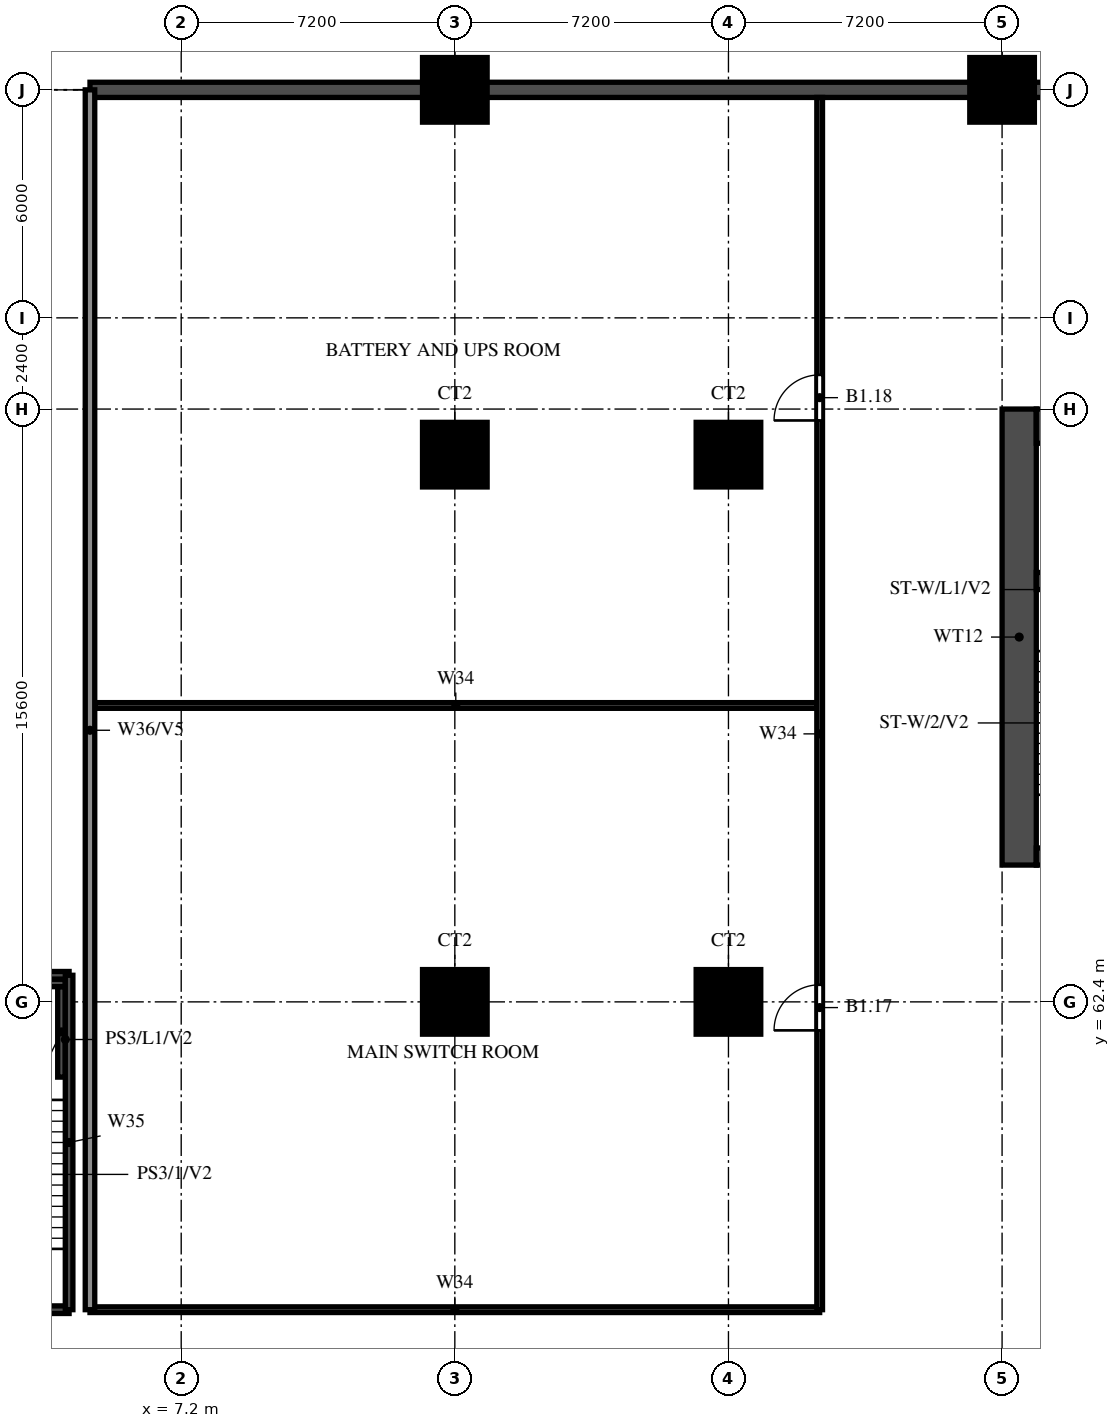
"""IFC4 building model, lengths in metres.
Left out: names, types, materials, properties, quantities, classifications, styles, units other than length and angle.
Written with IfcOpenShell. Run it as: python <this file> out.ifc"""

import sys

from ifc_helpers import new_model, si_unit, direction, frame, frame_2d, origin, origin_2d, place, context, subcontext, project, spatial, rectangle, extrude, source, transform, mapped, element, fill, save


model = new_model("IFC4")
c1 = context("Model", 3, precision=1e-05, world=origin(), true_north=direction((0.0, 1.0)))
c2 = subcontext(c1, "Body", "Model", "MODEL_VIEW")
j1 = project(units=[si_unit("LENGTHUNIT", "METRE"), si_unit("PLANEANGLEUNIT", "RADIAN")], contexts=[c1])
p1 = place(None, origin())
s1 = spatial("IfcSite", under=j1, at=p1, CompositionType="ELEMENT")
p2 = place(p1, origin())
s2 = spatial("IfcBuilding", under=s1, at=p2, CompositionType="ELEMENT")
p3 = place(p2, frame((0.0, 0.0, -5.4)))
s3 = spatial("IfcBuildingStorey", under=s2, at=p3, CompositionType="ELEMENT", Elevation=-5.4)
m1 = source(origin(), c2, "Body", "SweptSolid", [
    extrude(rectangle(XDim=1.7, YDim=1.7, at=origin_2d()), origin(), (0.0, 0.0, 1.0), 5.0),
])
for number, where, z_axis, x_axis in (
    (1, (14.4, 62.4, 0.0), (0.0, 0.0, 1.0), (1.0, 0.0, 0.0)),
    (2, (21.6, 62.4, 0.0), (0.0, 0.0, 1.0), (1.0, 0.0, 0.0)),
    (3, (14.4, 76.8, 0.0), (0.0, 0.0, 1.0), (1.0, 0.0, 0.0)),
    (4, (21.6, 76.8, 0.0), (0.0, 0.0, 1.0), (1.0, 0.0, 0.0)),
    (5, (14.4, 86.4, 0.0), (0.0, 0.0, 1.0), (1.0, 0.0, 0.0)),
    (6, (28.8, 86.4, 0.0), (0.0, 0.0, 1.0), (1.0, 0.0, 0.0)),
):
    element("IfcColumn", number, at=place(p3, frame(where, z_axis=z_axis, x_axis=x_axis)), inside=s3, PredefinedType="COLUMN", context=c2, shape_type="MappedRepresentation", body=[
        mapped(m1, transform((0.0, 0.0, 0.0))),
    ])
p4 = place(p3, frame((29.25, 66.0, 0.0), z_axis=(0.0, 0.0, 1.0), x_axis=(0.0, 1.0, 0.0)))
e7 = element("IfcWall", 7, at=p4, inside=s3, PredefinedType="SHEAR", context=c2, shape_type="SweptSolid", body=[
    extrude(rectangle(XDim=12.0, YDim=0.9, at=frame_2d((6.0, 0.0))), origin(), (0.0, 0.0, 1.0), 5.0),
])
p5 = place(p3, frame((29.7, 77.55, 0.0), z_axis=(0.0, 0.0, 1.0), x_axis=(1.0, 0.0, 0.0)))
e8 = element("IfcWall", 8, at=p5, inside=s3, PredefinedType="SHEAR", context=c2, shape_type="SweptSolid", body=[
    extrude(rectangle(XDim=41.4, YDim=0.9, at=frame_2d((20.7, 0.0))), origin(), (0.0, 0.0, 1.0), 5.0),
])
p6 = place(p3, frame((29.7, 66.225, 0.0), z_axis=(0.0, 0.0, 1.0), x_axis=(1.0, 0.0, 0.0)))
e9 = element("IfcWall", 9, at=p6, inside=s3, PredefinedType="SHEAR", context=c2, shape_type="SweptSolid", body=[
    extrude(rectangle(XDim=41.4, YDim=0.45, at=frame_2d((20.7, 0.0))), origin(), (0.0, 0.0, 1.0), 5.0),
])
p7 = place(p6, frame((0.925, 0.0, 0.0)))
e10 = element("IfcOpeningElement", 10, at=p7, cuts=e9, PredefinedType="OPENING", context=c2, shape_type="SweptSolid", body=[
    extrude(rectangle(XDim=1.1, YDim=2.1, at=frame_2d((0.55, 1.05))), frame((0.0, 0.235, 0.0), z_axis=(0.0, -1.0, 0.0), x_axis=(1.0, 0.0, 0.0)), (0.0, 0.0, 1.0), 0.47),
])
p8 = place(p6, frame((3.738, 0.0, 0.0)))
e11 = element("IfcOpeningElement", 11, at=p8, cuts=e9, PredefinedType="OPENING", context=c2, shape_type="SweptSolid", body=[
    extrude(rectangle(XDim=1.8, YDim=2.1, at=frame_2d((0.9, 1.05))), frame((0.0, 0.235, 0.0), z_axis=(0.0, -1.0, 0.0), x_axis=(1.0, 0.0, 0.0)), (0.0, 0.0, 1.0), 0.47),
])
p9 = place(p3, frame((29.7, 73.475, 0.0), z_axis=(0.0, 0.0, 1.0), x_axis=(1.0, 0.0, 0.0)))
e12 = element("IfcWall", 12, at=p9, inside=s3, PredefinedType="SHEAR", context=c2, shape_type="SweptSolid", body=[
    extrude(rectangle(XDim=3.175, YDim=0.45, at=frame_2d((1.587, 0.0))), origin(), (0.0, 0.0, 1.0), 5.0),
])
p10 = place(p3, frame((4.05, 60.42, 0.0), z_axis=(0.0, 0.0, 1.0), x_axis=(0.0, 1.0, 0.0)))
e13 = element("IfcWall", 13, at=p10, inside=s3, PredefinedType="SOLIDWALL", context=c2, shape_type="SweptSolid", body=[
    extrude(rectangle(XDim=2.38, YDim=0.2, at=frame_2d((1.19, 0.0))), origin(), (0.0, 0.0, 1.0), 2.5),
])
p11 = place(p3, frame((0.85, 62.9, 0.0), z_axis=(0.0, 0.0, 1.0), x_axis=(1.0, 0.0, 0.0)))
e14 = element("IfcWall", 14, at=p11, inside=s3, PredefinedType="SOLIDWALL", context=c2, shape_type="SweptSolid", body=[
    extrude(rectangle(XDim=3.3, YDim=0.2, at=frame_2d((1.65, 0.0))), origin(), (0.0, 0.0, 1.0), 2.5),
])
p12 = place(p3, frame((4.8, 54.3, 0.0), z_axis=(0.0, 0.0, 1.0), x_axis=(1.0, 0.0, 0.0)))
e15 = element("IfcWall", 15, at=p12, inside=s3, PredefinedType="PARTITIONING", context=c2, shape_type="SweptSolid", body=[
    extrude(rectangle(XDim=19.2, YDim=0.15, at=frame_2d((9.6, 0.0))), origin(), (0.0, 0.0, 1.0), 3.8),
])
p13 = place(p3, frame((0.0, 54.3, 0.0), z_axis=(0.0, 0.0, 1.0), x_axis=(1.0, 0.0, 0.0)))
e16 = element("IfcWall", 16, at=p13, inside=s3, PredefinedType="SOLIDWALL", context=c2, shape_type="SweptSolid", body=[
    extrude(rectangle(XDim=4.25, YDim=0.2, at=frame_2d((2.125, 0.0))), origin(), (0.0, 0.0, 1.0), 5.0),
])
p14 = place(p13, frame((2.025, 0.0, 0.0)))
e17 = element("IfcOpeningElement", 17, at=p14, cuts=e16, PredefinedType="OPENING", context=c2, shape_type="SweptSolid", body=[
    extrude(rectangle(XDim=1.1, YDim=2.1, at=frame_2d((0.55, 1.05))), frame((0.0, 0.11, 0.0), z_axis=(0.0, -1.0, 0.0), x_axis=(1.0, 0.0, 0.0)), (0.0, 0.0, 1.0), 0.22),
])
p15 = place(p3, frame((0.0, 63.1, 0.0), z_axis=(0.0, 0.0, 1.0), x_axis=(1.0, 0.0, 0.0)))
e18 = element("IfcWall", 18, at=p15, inside=s3, PredefinedType="SOLIDWALL", context=c2, shape_type="SweptSolid", body=[
    extrude(rectangle(XDim=4.25, YDim=0.2, at=frame_2d((2.125, 0.0))), origin(), (0.0, 0.0, 1.0), 5.0),
])
p16 = place(p3, frame((4.925, 70.2, 0.0), z_axis=(0.0, 0.0, 1.0), x_axis=(1.0, 0.0, 0.0)))
e19 = element("IfcWall", 19, at=p16, inside=s3, PredefinedType="PARTITIONING", context=c2, shape_type="SweptSolid", body=[
    extrude(rectangle(XDim=19.0, YDim=0.15, at=frame_2d((9.5, 0.0))), origin(), (0.0, 0.0, 1.0), 3.8),
])
p17 = place(p3, frame((4.8, 86.4, 0.0), z_axis=(0.0, 0.0, 1.0), x_axis=(1.0, 0.0, 0.0)))
e20 = element("IfcWall", 20, at=p17, inside=s3, PredefinedType="SOLIDWALL", context=c2, shape_type="SweptSolid", body=[
    extrude(rectangle(XDim=91.2, YDim=0.4, at=frame_2d((45.6, 0.0))), origin(), (0.0, 0.0, 1.0), 5.0),
])
p18 = place(p3, frame((4.25, 54.3, 0.0), z_axis=(0.0, 0.0, 1.0), x_axis=(0.0, 1.0, 0.0)))
e21 = element("IfcWall", 21, at=p18, inside=s3, PredefinedType="SOLIDWALL", context=c2, shape_type="SweptSolid", body=[
    extrude(rectangle(XDim=8.8, YDim=0.2, at=frame_2d((4.4, 0.0))), origin(), (0.0, 0.0, 1.0), 5.0),
])
p19 = place(p3, frame((4.8, 54.3, 0.0), z_axis=(0.0, 0.0, 1.0), x_axis=(0.0, 1.0, 0.0)))
e22 = element("IfcWall", 22, at=p19, inside=s3, PredefinedType="SOLIDWALL", context=c2, shape_type="SweptSolid", body=[
    extrude(rectangle(XDim=32.1, YDim=0.25, at=frame_2d((16.05, 0.0))), origin(), (0.0, 0.0, 1.0), 2.2),
])
p20 = place(p3, frame((24.0, 54.3, 0.0), z_axis=(0.0, 0.0, 1.0), x_axis=(0.0, 1.0, 0.0)))
e23 = element("IfcWall", 23, at=p20, inside=s3, PredefinedType="PARTITIONING", context=c2, shape_type="SweptSolid", body=[
    extrude(rectangle(XDim=31.9, YDim=0.15, at=frame_2d((15.95, 0.0))), origin(), (0.0, 0.0, 1.0), 3.8),
])
p21 = place(p20, frame((7.35, 0.0, 0.0)))
e24 = element("IfcOpeningElement", 24, at=p21, cuts=e23, PredefinedType="OPENING", context=c2, shape_type="SweptSolid", body=[
    extrude(rectangle(XDim=1.2, YDim=2.1, at=frame_2d((0.6, 1.05))), frame((0.0, 0.085, 0.0), z_axis=(0.0, -1.0, 0.0), x_axis=(1.0, 0.0, 0.0)), (0.0, 0.0, 1.0), 0.17),
])
p22 = place(p20, frame((23.4, 0.0, 0.0)))
e25 = element("IfcOpeningElement", 25, at=p22, cuts=e23, PredefinedType="OPENING", context=c2, shape_type="SweptSolid", body=[
    extrude(rectangle(XDim=1.2, YDim=2.1, at=frame_2d((0.6, 1.05))), frame((0.0, 0.085, 0.0), z_axis=(0.0, -1.0, 0.0), x_axis=(1.0, 0.0, 0.0)), (0.0, 0.0, 1.0), 0.17),
])
p23 = place(p21, origin())
e26 = element("IfcDoor", 26, at=p23, inside=s3, OperationType="SINGLE_SWING_LEFT", PredefinedType="DOOR", context=c2, shape_type="SweptSolid", body=[
    extrude(rectangle(XDim=1.2, YDim=2.1, at=frame_2d((0.6, 1.05))), frame((0.0, 0.025, 0.0), z_axis=(0.0, -1.0, 0.0), x_axis=(1.0, 0.0, 0.0)), (0.0, 0.0, 1.0), 0.05),
])
fill(e24, e26)
p24 = place(p22, origin())
e27 = element("IfcDoor", 27, at=p24, inside=s3, OperationType="SINGLE_SWING_RIGHT", PredefinedType="DOOR", context=c2, shape_type="SweptSolid", body=[
    extrude(rectangle(XDim=1.2, YDim=2.1, at=frame_2d((0.6, 1.05))), frame((0.0, 0.025, 0.0), z_axis=(0.0, -1.0, 0.0), x_axis=(1.0, 0.0, 0.0)), (0.0, 0.0, 1.0), 0.05),
])
fill(e25, e27)
save(model, sys.argv[1])
